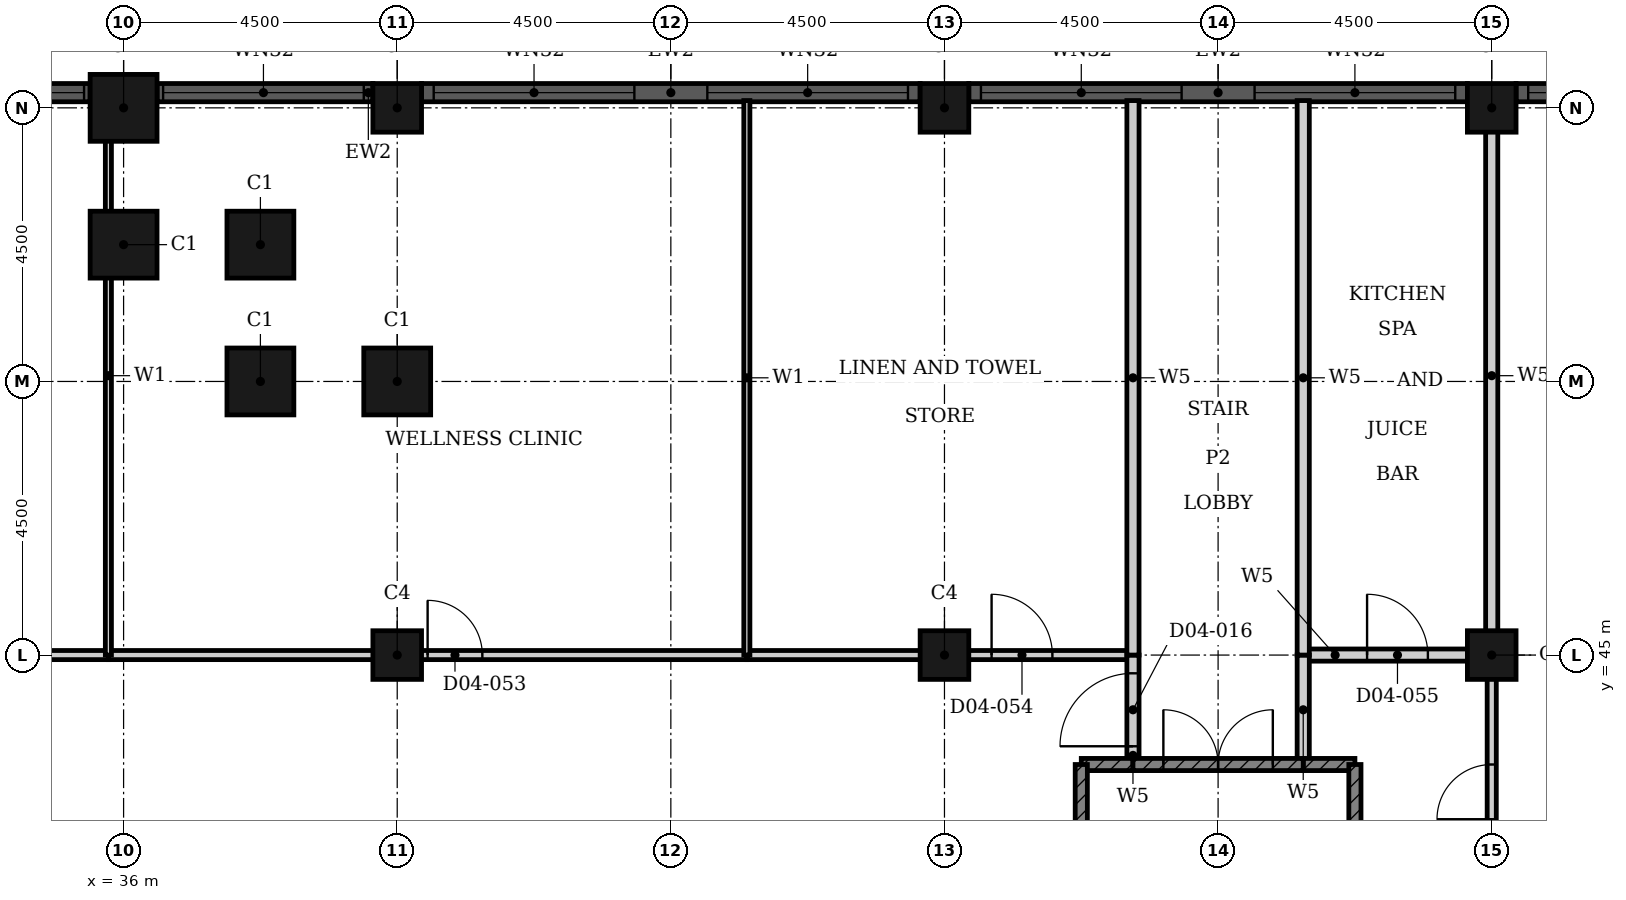
"""IFC4 building model, lengths in metres.
Left out: names, types, materials, properties, quantities, classifications, styles, units other than length and angle.
Written with IfcOpenShell. Run it as: python <this file> out.ifc"""

import sys

from ifc_helpers import new_model, si_unit, direction, frame, frame_2d, origin, origin_2d, place, context, subcontext, project, spatial, rectangle, hollow_rectangle, extrude, element, fill, save


model = new_model("IFC4")
c1 = context("Model", 3, precision=1e-05, world=origin(), true_north=direction((0.0, 1.0)))
c2 = subcontext(c1, "Body", "Model", "MODEL_VIEW")
j1 = project(units=[si_unit("LENGTHUNIT", "METRE"), si_unit("PLANEANGLEUNIT", "RADIAN")], contexts=[c1])
p1 = place(None, origin())
s1 = spatial("IfcSite", under=j1, at=p1, CompositionType="ELEMENT")
p2 = place(p1, origin())
s2 = spatial("IfcBuilding", under=s1, at=p2, CompositionType="ELEMENT")
p3 = place(p2, frame((0.0, 0.0, 24.0)))
s3 = spatial("IfcBuildingStorey", under=s2, at=p3, CompositionType="ELEMENT", Elevation=24.0)
for number, where, z_axis, x_axis in (
    (1, (40.5, 49.5, 0.0), (0.0, 0.0, 1.0), (1.0, 0.0, 0.0)),
    (2, (38.25, 49.5, 0.0), (0.0, 0.0, 1.0), (1.0, 0.0, 0.0)),
    (3, (38.25, 51.75, 0.0), (0.0, 0.0, 1.0), (1.0, 0.0, 0.0)),
    (4, (36.0, 51.75, 0.0), (0.0, 0.0, 1.0), (1.0, 0.0, 0.0)),
    (5, (36.0, 54.0, 0.0), (0.0, 0.0, 1.0), (1.0, 0.0, 0.0)),
):
    element("IfcColumn", number, at=place(p3, frame(where, z_axis=z_axis, x_axis=x_axis)), inside=s3, PredefinedType="COLUMN", context=c2, shape_type="SweptSolid", body=[
        extrude(hollow_rectangle(XDim=1.1, YDim=1.1, WallThickness=0.036, at=origin_2d()), origin(), (0.0, 0.0, 1.0), 4.8),
    ])
for number, where, z_axis, x_axis in (
    (6, (40.5, 54.0, 0.0), (0.0, 0.0, 1.0), (1.0, 0.0, 0.0)),
    (7, (49.5, 54.0, 0.0), (0.0, 0.0, 1.0), (1.0, 0.0, 0.0)),
    (8, (58.5, 54.0, 0.0), (0.0, 0.0, 1.0), (1.0, 0.0, 0.0)),
    (9, (40.5, 45.0, 0.0), (0.0, 0.0, 1.0), (1.0, 0.0, 0.0)),
    (10, (49.5, 45.0, 0.0), (0.0, 0.0, 1.0), (1.0, 0.0, 0.0)),
    (11, (58.5, 45.0, 0.0), (0.0, 0.0, 1.0), (1.0, 0.0, 0.0)),
):
    element("IfcColumn", number, at=place(p3, frame(where, z_axis=z_axis, x_axis=x_axis)), inside=s3, PredefinedType="COLUMN", context=c2, shape_type="SweptSolid", body=[
        extrude(hollow_rectangle(XDim=0.8, YDim=0.8, WallThickness=0.025, at=origin_2d()), origin(), (0.0, 0.0, 1.0), 4.8),
    ])
p4 = place(p3, frame((67.1, 54.25, 0.0), z_axis=(0.0, 0.0, 1.0), x_axis=(-1.0, 0.0, 0.0)))
e12 = element("IfcWall", 12, at=p4, inside=s3, PredefinedType="SOLIDWALL", context=c2, shape_type="SweptSolid", body=[
    extrude(rectangle(XDim=8.2, YDim=0.3, at=frame_2d((4.1, 0.0))), origin(), (0.0, 0.0, 1.0), 4.8),
])
p5 = place(p4, frame((0.2, 0.0, 0.9)))
e13 = element("IfcOpeningElement", 13, at=p5, cuts=e12, PredefinedType="OPENING", context=c2, shape_type="SweptSolid", body=[
    extrude(rectangle(XDim=3.3, YDim=2.9, at=frame_2d((1.65, 1.45))), frame((0.0, 0.16, 0.0), z_axis=(0.0, -1.0, 0.0), x_axis=(1.0, 0.0, 0.0)), (0.0, 0.0, 1.0), 0.32),
])
p6 = place(p4, frame((4.7, 0.0, 0.9)))
e14 = element("IfcOpeningElement", 14, at=p6, cuts=e12, PredefinedType="OPENING", context=c2, shape_type="SweptSolid", body=[
    extrude(rectangle(XDim=3.3, YDim=2.9, at=frame_2d((1.65, 1.45))), frame((0.0, 0.16, 0.0), z_axis=(0.0, -1.0, 0.0), x_axis=(1.0, 0.0, 0.0)), (0.0, 0.0, 1.0), 0.32),
])
p7 = place(p3, frame((58.1, 54.25, 0.0), z_axis=(0.0, 0.0, 1.0), x_axis=(-1.0, 0.0, 0.0)))
e15 = element("IfcWall", 15, at=p7, inside=s3, PredefinedType="SOLIDWALL", context=c2, shape_type="SweptSolid", body=[
    extrude(rectangle(XDim=8.2, YDim=0.3, at=frame_2d((4.1, 0.0))), origin(), (0.0, 0.0, 1.0), 4.8),
])
p8 = place(p7, frame((0.2, 0.0, 0.9)))
e16 = element("IfcOpeningElement", 16, at=p8, cuts=e15, PredefinedType="OPENING", context=c2, shape_type="SweptSolid", body=[
    extrude(rectangle(XDim=3.3, YDim=2.9, at=frame_2d((1.65, 1.45))), frame((0.0, 0.16, 0.0), z_axis=(0.0, -1.0, 0.0), x_axis=(1.0, 0.0, 0.0)), (0.0, 0.0, 1.0), 0.32),
])
p9 = place(p7, frame((4.7, 0.0, 0.9)))
e17 = element("IfcOpeningElement", 17, at=p9, cuts=e15, PredefinedType="OPENING", context=c2, shape_type="SweptSolid", body=[
    extrude(rectangle(XDim=3.3, YDim=2.9, at=frame_2d((1.65, 1.45))), frame((0.0, 0.16, 0.0), z_axis=(0.0, -1.0, 0.0), x_axis=(1.0, 0.0, 0.0)), (0.0, 0.0, 1.0), 0.32),
])
p10 = place(p3, frame((49.1, 54.25, 0.0), z_axis=(0.0, 0.0, 1.0), x_axis=(-1.0, 0.0, 0.0)))
e18 = element("IfcWall", 18, at=p10, inside=s3, PredefinedType="SOLIDWALL", context=c2, shape_type="SweptSolid", body=[
    extrude(rectangle(XDim=8.2, YDim=0.3, at=frame_2d((4.1, 0.0))), origin(), (0.0, 0.0, 1.0), 4.8),
])
p11 = place(p10, frame((0.2, 0.0, 0.9)))
e19 = element("IfcOpeningElement", 19, at=p11, cuts=e18, PredefinedType="OPENING", context=c2, shape_type="SweptSolid", body=[
    extrude(rectangle(XDim=3.3, YDim=2.9, at=frame_2d((1.65, 1.45))), frame((0.0, 0.16, 0.0), z_axis=(0.0, -1.0, 0.0), x_axis=(1.0, 0.0, 0.0)), (0.0, 0.0, 1.0), 0.32),
])
p12 = place(p10, frame((4.7, 0.0, 0.9)))
e20 = element("IfcOpeningElement", 20, at=p12, cuts=e18, PredefinedType="OPENING", context=c2, shape_type="SweptSolid", body=[
    extrude(rectangle(XDim=3.3, YDim=2.9, at=frame_2d((1.65, 1.45))), frame((0.0, 0.16, 0.0), z_axis=(0.0, -1.0, 0.0), x_axis=(1.0, 0.0, 0.0)), (0.0, 0.0, 1.0), 0.32),
])
p13 = place(p3, frame((40.1, 54.25, 0.0), z_axis=(0.0, 0.0, 1.0), x_axis=(-1.0, 0.0, 0.0)))
e21 = element("IfcWall", 21, at=p13, inside=s3, PredefinedType="SOLIDWALL", context=c2, shape_type="SweptSolid", body=[
    extrude(rectangle(XDim=3.55, YDim=0.3, at=frame_2d((1.775, 0.0))), origin(), (0.0, 0.0, 1.0), 4.8),
])
p14 = place(p13, frame((0.15, 0.0, 0.9)))
e22 = element("IfcOpeningElement", 22, at=p14, cuts=e21, PredefinedType="OPENING", context=c2, shape_type="SweptSolid", body=[
    extrude(rectangle(XDim=3.3, YDim=2.9, at=frame_2d((1.65, 1.45))), frame((0.0, 0.16, 0.0), z_axis=(0.0, -1.0, 0.0), x_axis=(1.0, 0.0, 0.0)), (0.0, 0.0, 1.0), 0.32),
])
p15 = place(p3, frame((35.45, 54.25, 0.0), z_axis=(0.0, 0.0, 1.0), x_axis=(-1.0, 0.0, 0.0)))
e23 = element("IfcWall", 23, at=p15, inside=s3, PredefinedType="SOLIDWALL", context=c2, shape_type="SweptSolid", body=[
    extrude(rectangle(XDim=3.55, YDim=0.3, at=frame_2d((1.775, 0.0))), origin(), (0.0, 0.0, 1.0), 4.8),
])
p16 = place(p15, frame((0.1, 0.0, 0.9)))
e24 = element("IfcOpeningElement", 24, at=p16, cuts=e23, PredefinedType="OPENING", context=c2, shape_type="SweptSolid", body=[
    extrude(rectangle(XDim=3.3, YDim=2.9, at=frame_2d((1.65, 1.45))), frame((0.0, 0.16, 0.0), z_axis=(0.0, -1.0, 0.0), x_axis=(1.0, 0.0, 0.0)), (0.0, 0.0, 1.0), 0.32),
])
p17 = place(p3, frame((22.0, 45.0, 0.0), z_axis=(0.0, 0.0, 1.0), x_axis=(1.0, 0.0, 0.0)))
e25 = element("IfcWall", 25, at=p17, inside=s3, PredefinedType="PARTITIONING", context=c2, shape_type="SweptSolid", body=[
    extrude(rectangle(XDim=13.75, YDim=0.15, at=frame_2d((6.875, 0.0))), origin(), (0.0, 0.0, 1.0), 4.45),
])
p18 = place(p17, frame((6.275, 0.0, 0.0)))
e26 = element("IfcOpeningElement", 26, at=p18, cuts=e25, PredefinedType="OPENING", context=c2, shape_type="SweptSolid", body=[
    extrude(rectangle(XDim=1.2, YDim=2.4, at=frame_2d((0.6, 1.2))), frame((0.0, 0.085, 0.0), z_axis=(0.0, -1.0, 0.0), x_axis=(1.0, 0.0, 0.0)), (0.0, 0.0, 1.0), 0.17),
])
p19 = place(p3, frame((35.75, 45.0, 0.0), z_axis=(0.0, 0.0, 1.0), x_axis=(1.0, 0.0, 0.0)))
e27 = element("IfcWall", 27, at=p19, inside=s3, PredefinedType="PARTITIONING", context=c2, shape_type="SweptSolid", body=[
    extrude(rectangle(XDim=10.5, YDim=0.15, at=frame_2d((5.25, 0.0))), origin(), (0.0, 0.0, 1.0), 4.45),
])
p20 = place(p19, frame((5.25, 0.0, 0.0)))
e28 = element("IfcOpeningElement", 28, at=p20, cuts=e27, PredefinedType="OPENING", context=c2, shape_type="SweptSolid", body=[
    extrude(rectangle(XDim=0.9, YDim=2.1, at=frame_2d((0.45, 1.05))), frame((0.0, 0.085, 0.0), z_axis=(0.0, -1.0, 0.0), x_axis=(1.0, 0.0, 0.0)), (0.0, 0.0, 1.0), 0.17),
])
p21 = place(p3, frame((46.25, 45.0, 0.0), z_axis=(0.0, 0.0, 1.0), x_axis=(1.0, 0.0, 0.0)))
e29 = element("IfcWall", 29, at=p21, inside=s3, PredefinedType="PARTITIONING", context=c2, shape_type="SweptSolid", body=[
    extrude(rectangle(XDim=6.35, YDim=0.15, at=frame_2d((3.175, 0.0))), origin(), (0.0, 0.0, 1.0), 4.45),
])
p22 = place(p21, frame((4.025, 0.0, 0.0)))
e30 = element("IfcOpeningElement", 30, at=p22, cuts=e29, PredefinedType="OPENING", context=c2, shape_type="SweptSolid", body=[
    extrude(rectangle(XDim=1.0, YDim=2.1, at=frame_2d((0.5, 1.05))), frame((0.0, 0.085, 0.0), z_axis=(0.0, -1.0, 0.0), x_axis=(1.0, 0.0, 0.0)), (0.0, 0.0, 1.0), 0.17),
])
p23 = place(p3, frame((58.5, 40.5, 0.0), z_axis=(0.0, 0.0, 1.0), x_axis=(0.0, 1.0, 0.0)))
e31 = element("IfcWall", 31, at=p23, inside=s3, PredefinedType="PARTITIONING", context=c2, shape_type="SweptSolid", body=[
    extrude(rectangle(XDim=4.5, YDim=0.15, at=frame_2d((2.25, 0.0))), origin(), (0.0, 0.0, 1.0), 4.45),
])
p24 = place(p23, frame((1.8, 0.0, 0.0)))
e32 = element("IfcOpeningElement", 32, at=p24, cuts=e31, PredefinedType="OPENING", context=c2, shape_type="SweptSolid", body=[
    extrude(rectangle(XDim=0.9, YDim=2.1, at=frame_2d((0.45, 1.05))), frame((0.0, 0.085, 0.0), z_axis=(0.0, -1.0, 0.0), x_axis=(1.0, 0.0, 0.0)), (0.0, 0.0, 1.0), 0.17),
])
p25 = place(p3, frame((35.75, 45.0, 0.0), z_axis=(0.0, 0.0, 1.0), x_axis=(0.0, 1.0, 0.0)))
e33 = element("IfcWall", 33, at=p25, inside=s3, PredefinedType="PARTITIONING", context=c2, shape_type="SweptSolid", body=[
    extrude(rectangle(XDim=9.19, YDim=0.1, at=frame_2d((4.595, 0.0))), origin(), (0.0, 0.0, 1.0), 4.45),
])
p26 = place(p3, frame((46.25, 45.0, 0.0), z_axis=(0.0, 0.0, 1.0), x_axis=(0.0, 1.0, 0.0)))
e34 = element("IfcWall", 34, at=p26, inside=s3, PredefinedType="PARTITIONING", context=c2, shape_type="SweptSolid", body=[
    extrude(rectangle(XDim=9.12, YDim=0.1, at=frame_2d((4.56, 0.0))), origin(), (0.0, 0.0, 1.0), 4.45),
])
p27 = place(p3, frame((55.4, 45.0, 0.0), z_axis=(0.0, 0.0, 1.0), x_axis=(1.0, 0.0, 0.0)))
e35 = element("IfcWall", 35, at=p27, inside=s3, PredefinedType="PARTITIONING", context=c2, shape_type="SweptSolid", body=[
    extrude(rectangle(XDim=3.1, YDim=0.2, at=frame_2d((1.55, 0.0))), origin(), (0.0, 0.0, 1.0), 4.45),
])
p28 = place(p27, frame((1.05, 0.0, 0.0)))
e36 = element("IfcOpeningElement", 36, at=p28, cuts=e35, PredefinedType="OPENING", context=c2, shape_type="SweptSolid", body=[
    extrude(rectangle(XDim=1.0, YDim=2.1, at=frame_2d((0.5, 1.05))), frame((0.0, 0.11, 0.0), z_axis=(0.0, -1.0, 0.0), x_axis=(1.0, 0.0, 0.0)), (0.0, 0.0, 1.0), 0.22),
])
p29 = place(p3, frame((52.6, 43.2, 0.0), z_axis=(0.0, 0.0, 1.0), x_axis=(0.0, 1.0, 0.0)))
e37 = element("IfcWall", 37, at=p29, inside=s3, PredefinedType="PARTITIONING", context=c2, shape_type="SweptSolid", body=[
    extrude(rectangle(XDim=1.8, YDim=0.2, at=frame_2d((0.9, 0.0))), origin(), (0.0, 0.0, 1.0), 4.45),
])
p30 = place(p29, frame((0.3, 0.0, 0.0)))
e38 = element("IfcOpeningElement", 38, at=p30, cuts=e37, PredefinedType="OPENING", context=c2, shape_type="SweptSolid", body=[
    extrude(rectangle(XDim=1.2, YDim=2.1, at=frame_2d((0.6, 1.05))), frame((0.0, 0.11, 0.0), z_axis=(0.0, -1.0, 0.0), x_axis=(1.0, 0.0, 0.0)), (0.0, 0.0, 1.0), 0.22),
])
p31 = place(p3, frame((52.6, 45.0, 0.0), z_axis=(0.0, 0.0, 1.0), x_axis=(0.0, 1.0, 0.0)))
e39 = element("IfcWall", 39, at=p31, inside=s3, PredefinedType="PARTITIONING", context=c2, shape_type="SweptSolid", body=[
    extrude(rectangle(XDim=9.12, YDim=0.2, at=frame_2d((4.56, 0.0))), origin(), (0.0, 0.0, 1.0), 4.45),
])
p32 = place(p3, frame((55.4, 43.2, 0.0), z_axis=(0.0, 0.0, 1.0), x_axis=(0.0, 1.0, 0.0)))
e40 = element("IfcWall", 40, at=p32, inside=s3, PredefinedType="PARTITIONING", context=c2, shape_type="SweptSolid", body=[
    extrude(rectangle(XDim=1.8, YDim=0.2, at=frame_2d((0.9, 0.0))), origin(), (0.0, 0.0, 1.0), 4.45),
])
p33 = place(p3, frame((55.4, 45.0, 0.0), z_axis=(0.0, 0.0, 1.0), x_axis=(0.0, 1.0, 0.0)))
e41 = element("IfcWall", 41, at=p33, inside=s3, PredefinedType="PARTITIONING", context=c2, shape_type="SweptSolid", body=[
    extrude(rectangle(XDim=9.12, YDim=0.2, at=frame_2d((4.56, 0.0))), origin(), (0.0, 0.0, 1.0), 4.45),
])
p34 = place(p3, frame((58.5, 45.0, 0.0), z_axis=(0.0, 0.0, 1.0), x_axis=(0.0, 1.0, 0.0)))
e42 = element("IfcWall", 42, at=p34, inside=s3, PredefinedType="PARTITIONING", context=c2, shape_type="SweptSolid", body=[
    extrude(rectangle(XDim=9.19, YDim=0.2, at=frame_2d((4.595, 0.0))), origin(), (0.0, 0.0, 1.0), 4.45),
])
for number, where, z_axis, x_axis in (
    (43, (51.75, 43.2, 0.0), (0.0, 0.0, 1.0), (1.0, 0.0, 0.0)),
    (44, (55.4, 43.2, 0.0), (0.0, 0.0, 1.0), (1.0, 0.0, 0.0)),
):
    element("IfcWall", number, at=place(p3, frame(where, z_axis=z_axis, x_axis=x_axis)), inside=s3, PredefinedType="SHEAR", context=c2, shape_type="SweptSolid", body=[
        extrude(rectangle(XDim=0.85, YDim=0.2, at=frame_2d((0.425, 0.0))), origin(), (0.0, 0.0, 1.0), 4.45),
    ])
p35 = place(p3, frame((52.6, 43.2, 0.0), z_axis=(0.0, 0.0, 1.0), x_axis=(1.0, 0.0, 0.0)))
e45 = element("IfcWall", 45, at=p35, inside=s3, PredefinedType="SHEAR", context=c2, shape_type="SweptSolid", body=[
    extrude(rectangle(XDim=2.8, YDim=0.2, at=frame_2d((1.4, 0.0))), origin(), (0.0, 0.0, 1.0), 4.45),
])
p36 = place(p35, frame((0.5, 0.0, 0.0)))
e46 = element("IfcOpeningElement", 46, at=p36, cuts=e45, PredefinedType="OPENING", context=c2, shape_type="SweptSolid", body=[
    extrude(rectangle(XDim=1.8, YDim=2.1, at=frame_2d((0.9, 1.05))), frame((0.0, 0.11, 0.0), z_axis=(0.0, -1.0, 0.0), x_axis=(1.0, 0.0, 0.0)), (0.0, 0.0, 1.0), 0.22),
])
for number, where, z_axis, x_axis in (
    (47, (51.75, 34.75, 0.0), (0.0, 0.0, 1.0), (0.0, 1.0, 0.0)),
    (48, (56.25, 34.75, 0.0), (0.0, 0.0, 1.0), (0.0, 1.0, 0.0)),
):
    element("IfcWall", number, at=place(p3, frame(where, z_axis=z_axis, x_axis=x_axis)), inside=s3, PredefinedType="SHEAR", context=c2, shape_type="SweptSolid", body=[
        extrude(rectangle(XDim=8.45, YDim=0.2, at=frame_2d((4.225, 0.0))), origin(), (0.0, 0.0, 1.0), 4.45),
    ])
p37 = place(p6, origin())
e49 = element("IfcWindow", 49, at=p37, inside=s3, PartitioningType="SINGLE_PANEL", PredefinedType="WINDOW", context=c2, shape_type="SweptSolid", body=[
    extrude(rectangle(XDim=3.3, YDim=2.9, at=frame_2d((1.65, 1.45))), frame((0.0, 0.03, 0.0), z_axis=(0.0, -1.0, 0.0), x_axis=(1.0, 0.0, 0.0)), (0.0, 0.0, 1.0), 0.06),
])
fill(e14, e49)
p38 = place(p8, origin())
e50 = element("IfcWindow", 50, at=p38, inside=s3, PartitioningType="SINGLE_PANEL", PredefinedType="WINDOW", context=c2, shape_type="SweptSolid", body=[
    extrude(rectangle(XDim=3.3, YDim=2.9, at=frame_2d((1.65, 1.45))), frame((0.0, 0.03, 0.0), z_axis=(0.0, -1.0, 0.0), x_axis=(1.0, 0.0, 0.0)), (0.0, 0.0, 1.0), 0.06),
])
fill(e16, e50)
p39 = place(p9, origin())
e51 = element("IfcWindow", 51, at=p39, inside=s3, PartitioningType="SINGLE_PANEL", PredefinedType="WINDOW", context=c2, shape_type="SweptSolid", body=[
    extrude(rectangle(XDim=3.3, YDim=2.9, at=frame_2d((1.65, 1.45))), frame((0.0, 0.03, 0.0), z_axis=(0.0, -1.0, 0.0), x_axis=(1.0, 0.0, 0.0)), (0.0, 0.0, 1.0), 0.06),
])
fill(e17, e51)
p40 = place(p11, origin())
e52 = element("IfcWindow", 52, at=p40, inside=s3, PartitioningType="SINGLE_PANEL", PredefinedType="WINDOW", context=c2, shape_type="SweptSolid", body=[
    extrude(rectangle(XDim=3.3, YDim=2.9, at=frame_2d((1.65, 1.45))), frame((0.0, 0.03, 0.0), z_axis=(0.0, -1.0, 0.0), x_axis=(1.0, 0.0, 0.0)), (0.0, 0.0, 1.0), 0.06),
])
fill(e19, e52)
p41 = place(p12, origin())
e53 = element("IfcWindow", 53, at=p41, inside=s3, PartitioningType="SINGLE_PANEL", PredefinedType="WINDOW", context=c2, shape_type="SweptSolid", body=[
    extrude(rectangle(XDim=3.3, YDim=2.9, at=frame_2d((1.65, 1.45))), frame((0.0, 0.03, 0.0), z_axis=(0.0, -1.0, 0.0), x_axis=(1.0, 0.0, 0.0)), (0.0, 0.0, 1.0), 0.06),
])
fill(e20, e53)
p42 = place(p14, origin())
e54 = element("IfcWindow", 54, at=p42, inside=s3, PartitioningType="SINGLE_PANEL", PredefinedType="WINDOW", context=c2, shape_type="SweptSolid", body=[
    extrude(rectangle(XDim=3.3, YDim=2.9, at=frame_2d((1.65, 1.45))), frame((0.0, 0.03, 0.0), z_axis=(0.0, -1.0, 0.0), x_axis=(1.0, 0.0, 0.0)), (0.0, 0.0, 1.0), 0.06),
])
fill(e22, e54)
p43 = place(p16, origin())
e55 = element("IfcWindow", 55, at=p43, inside=s3, PartitioningType="SINGLE_PANEL", PredefinedType="WINDOW", context=c2, shape_type="SweptSolid", body=[
    extrude(rectangle(XDim=3.3, YDim=2.9, at=frame_2d((1.65, 1.45))), frame((0.0, 0.03, 0.0), z_axis=(0.0, -1.0, 0.0), x_axis=(1.0, 0.0, 0.0)), (0.0, 0.0, 1.0), 0.06),
])
fill(e24, e55)
p44 = place(p30, origin())
e56 = element("IfcDoor", 56, at=p44, inside=s3, OperationType="SINGLE_SWING_LEFT", PredefinedType="DOOR", context=c2, shape_type="SweptSolid", body=[
    extrude(rectangle(XDim=1.2, YDim=2.1, at=frame_2d((0.6, 1.05))), frame((0.0, 0.025, 0.0), z_axis=(0.0, -1.0, 0.0), x_axis=(1.0, 0.0, 0.0)), (0.0, 0.0, 1.0), 0.05),
])
fill(e38, e56)
p45 = place(p36, origin())
e57 = element("IfcDoor", 57, at=p45, inside=s3, OperationType="DOUBLE_DOOR_SINGLE_SWING", PredefinedType="DOOR", context=c2, shape_type="SweptSolid", body=[
    extrude(rectangle(XDim=1.8, YDim=2.1, at=frame_2d((0.9, 1.05))), frame((0.0, 0.025, 0.0), z_axis=(0.0, -1.0, 0.0), x_axis=(1.0, 0.0, 0.0)), (0.0, 0.0, 1.0), 0.05),
])
fill(e46, e57)
p46 = place(p24, origin())
e58 = element("IfcDoor", 58, at=p46, inside=s3, OperationType="SINGLE_SWING_LEFT", PredefinedType="DOOR", context=c2, shape_type="SweptSolid", body=[
    extrude(rectangle(XDim=0.9, YDim=2.1, at=frame_2d((0.45, 1.05))), frame((0.0, 0.025, 0.0), z_axis=(0.0, -1.0, 0.0), x_axis=(1.0, 0.0, 0.0)), (0.0, 0.0, 1.0), 0.05),
])
fill(e32, e58)
p47 = place(p20, origin())
e59 = element("IfcDoor", 59, at=p47, inside=s3, OperationType="SINGLE_SWING_RIGHT", PredefinedType="DOOR", context=c2, shape_type="SweptSolid", body=[
    extrude(rectangle(XDim=0.9, YDim=2.1, at=frame_2d((0.45, 1.05))), frame((0.0, 0.025, 0.0), z_axis=(0.0, -1.0, 0.0), x_axis=(1.0, 0.0, 0.0)), (0.0, 0.0, 1.0), 0.05),
])
fill(e28, e59)
p48 = place(p22, origin())
e60 = element("IfcDoor", 60, at=p48, inside=s3, OperationType="SINGLE_SWING_RIGHT", PredefinedType="DOOR", context=c2, shape_type="SweptSolid", body=[
    extrude(rectangle(XDim=1.0, YDim=2.1, at=frame_2d((0.5, 1.05))), frame((0.0, 0.025, 0.0), z_axis=(0.0, -1.0, 0.0), x_axis=(1.0, 0.0, 0.0)), (0.0, 0.0, 1.0), 0.05),
])
fill(e30, e60)
p49 = place(p28, origin())
e61 = element("IfcDoor", 61, at=p49, inside=s3, OperationType="SINGLE_SWING_LEFT", PredefinedType="DOOR", context=c2, shape_type="SweptSolid", body=[
    extrude(rectangle(XDim=1.0, YDim=2.1, at=frame_2d((0.5, 1.05))), frame((0.0, 0.025, 0.0), z_axis=(0.0, -1.0, 0.0), x_axis=(1.0, 0.0, 0.0)), (0.0, 0.0, 1.0), 0.05),
])
fill(e36, e61)
save(model, sys.argv[1])
